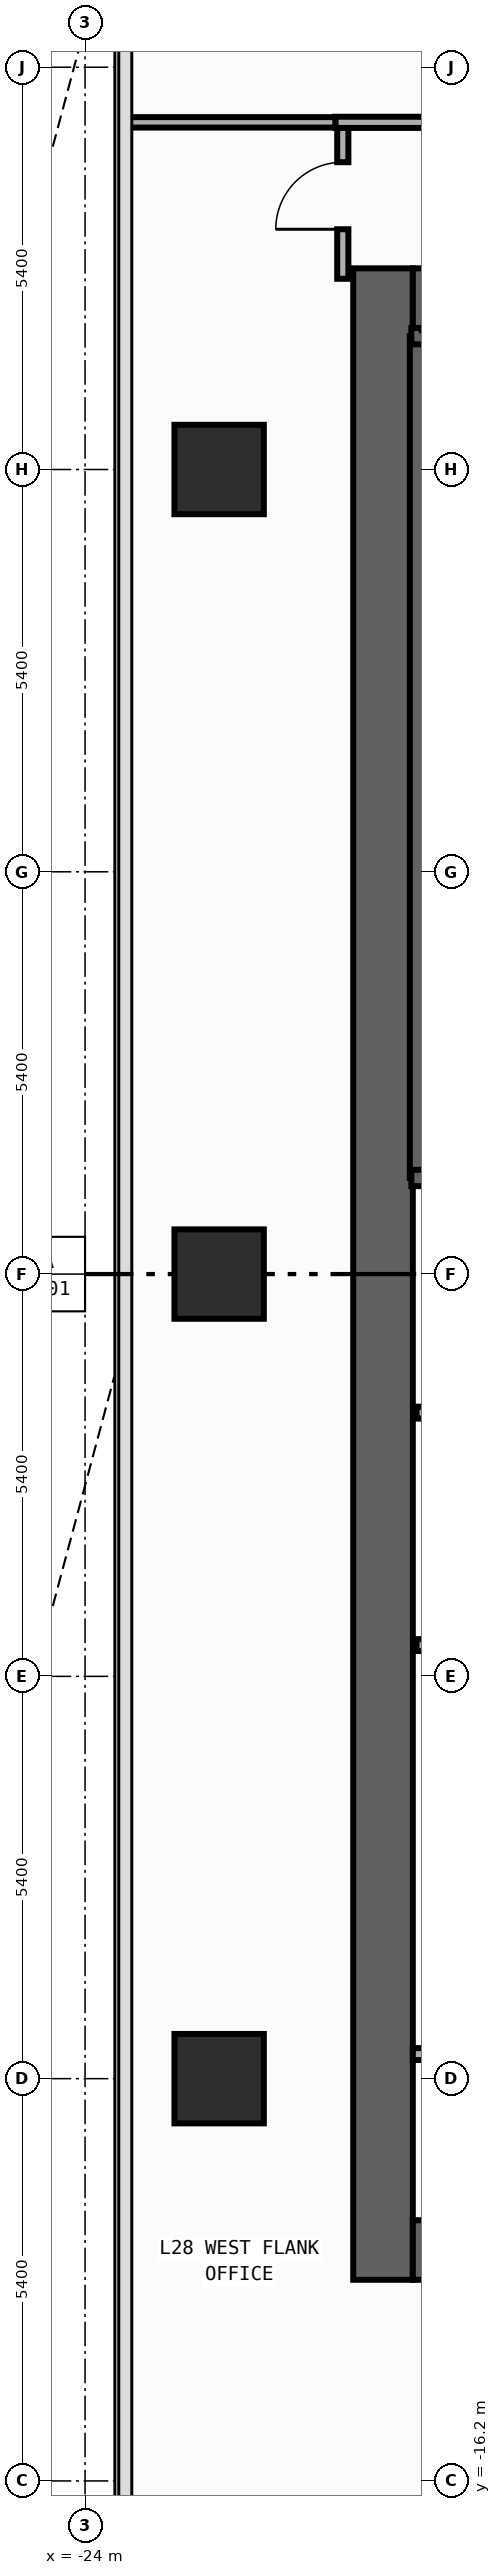
"""IFC4 building model, lengths in metres.
Left out: names, types, materials, properties, quantities, classifications, styles, units other than length and angle.
Written with IfcOpenShell. Run it as: python <this file> out.ifc"""

import sys

from ifc_helpers import new_model, si_unit, direction, frame, frame_2d, origin, origin_2d, place, context, subcontext, project, spatial, rectangle, extrude, element, fill, save


model = new_model("IFC4")
c1 = context("Model", 3, precision=1e-05, world=origin(), true_north=direction((0.0, 1.0)))
c2 = subcontext(c1, "Body", "Model", "MODEL_VIEW")
j1 = project(units=[si_unit("LENGTHUNIT", "METRE"), si_unit("PLANEANGLEUNIT", "RADIAN")], contexts=[c1])
p1 = place(None, origin())
s1 = spatial("IfcSite", under=j1, at=p1, CompositionType="ELEMENT")
p2 = place(p1, origin())
s2 = spatial("IfcBuilding", under=s1, at=p2, CompositionType="ELEMENT")
p3 = place(p2, frame((0.0, 0.0, 122.6)))
s3 = spatial("IfcBuildingStorey", under=s2, at=p3, CompositionType="ELEMENT", Elevation=122.6)
p4 = place(p3, frame((-20.0, -13.5, 0.0), z_axis=(0.0, 0.0, 1.0), x_axis=(0.0, 1.0, 0.0)))
e1 = element("IfcWall", 1, at=p4, inside=s3, PredefinedType="SHEAR", context=c2, shape_type="SweptSolid", body=[
    extrude(rectangle(XDim=27.0, YDim=0.8, at=frame_2d((13.5, 0.0))), origin(), (0.0, 0.0, 1.0), 3.94),
])
for number, where, z_axis, x_axis in (
    (2, (-19.6, -13.1, 0.0), (0.0, 0.0, 1.0), (1.0, 0.0, 0.0)),
    (3, (-19.6, 13.1, 0.0), (0.0, 0.0, 1.0), (1.0, 0.0, 0.0)),
):
    element("IfcWall", number, at=place(p3, frame(where, z_axis=z_axis, x_axis=x_axis)), inside=s3, PredefinedType="SHEAR", context=c2, shape_type="SweptSolid", body=[
        extrude(rectangle(XDim=6.8, YDim=0.8, at=frame_2d((3.4, 0.0))), origin(), (0.0, 0.0, 1.0), 3.94),
    ])
p5 = place(p3, frame((-19.53, 1.29, 0.0), z_axis=(0.0, 0.0, 1.0), x_axis=(0.0, 1.0, 0.0)))
e4 = element("IfcWall", 4, at=p5, inside=s3, PredefinedType="SHEAR", context=c2, shape_type="SweptSolid", body=[
    extrude(rectangle(XDim=11.3, YDim=0.22, at=frame_2d((5.65, 0.0))), origin(), (0.0, 0.0, 1.0), 3.94),
])
p6 = place(p3, frame((-19.62, 12.59, 0.0), z_axis=(0.0, 0.0, 1.0), x_axis=(1.0, 0.0, 0.0)))
e5 = element("IfcWall", 5, at=p6, inside=s3, PredefinedType="SHEAR", context=c2, shape_type="SweptSolid", body=[
    extrude(rectangle(XDim=3.915, YDim=0.22, at=frame_2d((1.958, 0.0))), origin(), (0.0, 0.0, 1.0), 3.94),
])
p7 = place(p3, frame((-19.62, 1.29, 0.0), z_axis=(0.0, 0.0, 1.0), x_axis=(1.0, 0.0, 0.0)))
e6 = element("IfcWall", 6, at=p7, inside=s3, PredefinedType="SHEAR", context=c2, shape_type="SweptSolid", body=[
    extrude(rectangle(XDim=3.915, YDim=0.22, at=frame_2d((1.958, 0.0))), origin(), (0.0, 0.0, 1.0), 3.94),
])
p8 = place(p7, frame((1.08, 0.0, 0.0)))
e7 = element("IfcOpeningElement", 7, at=p8, cuts=e6, PredefinedType="OPENING", context=c2, shape_type="SweptSolid", body=[
    extrude(rectangle(XDim=1.1, YDim=2.2, at=frame_2d((0.55, 1.1))), frame((0.0, 0.12, 0.0), z_axis=(0.0, -1.0, 0.0), x_axis=(1.0, 0.0, 0.0)), (0.0, 0.0, 1.0), 0.24),
])
for number, where, z_axis, x_axis in (
    (8, (-22.2, -10.8, 0.0), (0.0, 0.0, 1.0), (1.0, 0.0, 0.0)),
    (9, (-22.2, 0.0, 0.0), (0.0, 0.0, 1.0), (1.0, 0.0, 0.0)),
    (10, (-22.2, 10.8, 0.0), (0.0, 0.0, 1.0), (1.0, 0.0, 0.0)),
):
    element("IfcColumn", number, at=place(p3, frame(where, z_axis=z_axis, x_axis=x_axis)), inside=s3, PredefinedType="COLUMN", context=c2, shape_type="SweptSolid", body=[
        extrude(rectangle(XDim=1.2, YDim=1.2, at=origin_2d()), origin(), (0.0, 0.0, 1.0), 4.2),
    ])
p9 = place(p3, frame((-19.55, -1.86, 0.0), z_axis=(0.0, 0.0, 1.0), x_axis=(1.0, 0.0, 0.0)))
e11 = element("IfcWall", 11, at=p9, inside=s3, PredefinedType="STANDARD", context=c2, shape_type="SweptSolid", body=[
    extrude(rectangle(XDim=3.8, YDim=0.16, at=frame_2d((1.9, 0.0))), origin(), (0.0, 0.0, 1.0), 3.94),
])
p10 = place(p9, frame((1.18, 0.0, 0.0)))
e12 = element("IfcOpeningElement", 12, at=p10, cuts=e11, PredefinedType="OPENING", context=c2, shape_type="SweptSolid", body=[
    extrude(rectangle(XDim=1.15, YDim=2.2, at=frame_2d((0.575, 1.1))), frame((0.0, 0.09, 0.0), z_axis=(0.0, -1.0, 0.0), x_axis=(1.0, 0.0, 0.0)), (0.0, 0.0, 1.0), 0.18),
])
p11 = place(p3, frame((-19.55, -4.98, 0.0), z_axis=(0.0, 0.0, 1.0), x_axis=(1.0, 0.0, 0.0)))
e13 = element("IfcWall", 13, at=p11, inside=s3, PredefinedType="STANDARD", context=c2, shape_type="SweptSolid", body=[
    extrude(rectangle(XDim=3.8, YDim=0.16, at=frame_2d((1.9, 0.0))), origin(), (0.0, 0.0, 1.0), 3.94),
])
p12 = place(p3, frame((-19.6, -10.47, 0.0), z_axis=(0.0, 0.0, 1.0), x_axis=(1.0, 0.0, 0.0)))
e14 = element("IfcWall", 14, at=p12, inside=s3, PredefinedType="PARTITIONING", context=c2, shape_type="SweptSolid", body=[
    extrude(rectangle(XDim=2.29, YDim=0.16, at=frame_2d((1.145, 0.0))), origin(), (0.0, 0.0, 1.0), 3.94),
])
p13 = place(p3, frame((-20.54, 13.36, 0.0), z_axis=(0.0, 0.0, 1.0), x_axis=(0.0, 1.0, 0.0)))
e15 = element("IfcWall", 15, at=p13, inside=s3, PredefinedType="PARTITIONING", context=c2, shape_type="SweptSolid", body=[
    extrude(rectangle(XDim=2.025, YDim=0.15, at=frame_2d((1.012, 0.0))), origin(), (0.0, 0.0, 1.0), 3.94),
])
p14 = place(p13, frame((0.665, 0.0, 0.0)))
e16 = element("IfcOpeningElement", 16, at=p14, cuts=e15, PredefinedType="OPENING", context=c2, shape_type="SweptSolid", body=[
    extrude(rectangle(XDim=0.9, YDim=2.15, at=frame_2d((0.45, 1.075))), frame((0.0, 0.085, 0.0), z_axis=(0.0, -1.0, 0.0), x_axis=(1.0, 0.0, 0.0)), (0.0, 0.0, 1.0), 0.17),
])
p15 = place(p3, frame((-20.64, 15.46, 0.0), z_axis=(0.0, 0.0, 1.0), x_axis=(1.0, 0.0, 0.0)))
e17 = element("IfcWall", 17, at=p15, inside=s3, PredefinedType="PARTITIONING", context=c2, shape_type="SweptSolid", body=[
    extrude(rectangle(XDim=8.194, YDim=0.15, at=frame_2d((4.097, 0.0))), origin(), (0.0, 0.0, 1.0), 3.94),
])
p16 = place(p15, frame((2.722, 0.0, 0.0)))
e18 = element("IfcOpeningElement", 18, at=p16, cuts=e17, PredefinedType="OPENING", context=c2, shape_type="SweptSolid", body=[
    extrude(rectangle(XDim=0.9, YDim=2.15, at=frame_2d((0.45, 1.075))), frame((0.0, 0.085, 0.0), z_axis=(0.0, -1.0, 0.0), x_axis=(1.0, 0.0, 0.0)), (0.0, 0.0, 1.0), 0.17),
])
p17 = place(p3, frame((-23.455, 15.46, 0.0), z_axis=(0.0, 0.0, 1.0), x_axis=(1.0, 0.0, 0.0)))
e19 = element("IfcWall", 19, at=p17, inside=s3, PredefinedType="PARTITIONING", context=c2, shape_type="SweptSolid", body=[
    extrude(rectangle(XDim=2.815, YDim=0.14, at=frame_2d((1.408, 0.0))), origin(), (0.0, 0.0, 1.0), 3.94),
])
p18 = place(p14, origin())
e20 = element("IfcDoor", 20, at=p18, inside=s3, OperationType="SINGLE_SWING_LEFT", PredefinedType="DOOR", context=c2, shape_type="SweptSolid", body=[
    extrude(rectangle(XDim=0.9, YDim=2.15, at=frame_2d((0.45, 1.075))), frame((0.0, 0.025, 0.0), z_axis=(0.0, -1.0, 0.0), x_axis=(1.0, 0.0, 0.0)), (0.0, 0.0, 1.0), 0.05),
])
fill(e16, e20)
save(model, sys.argv[1])
